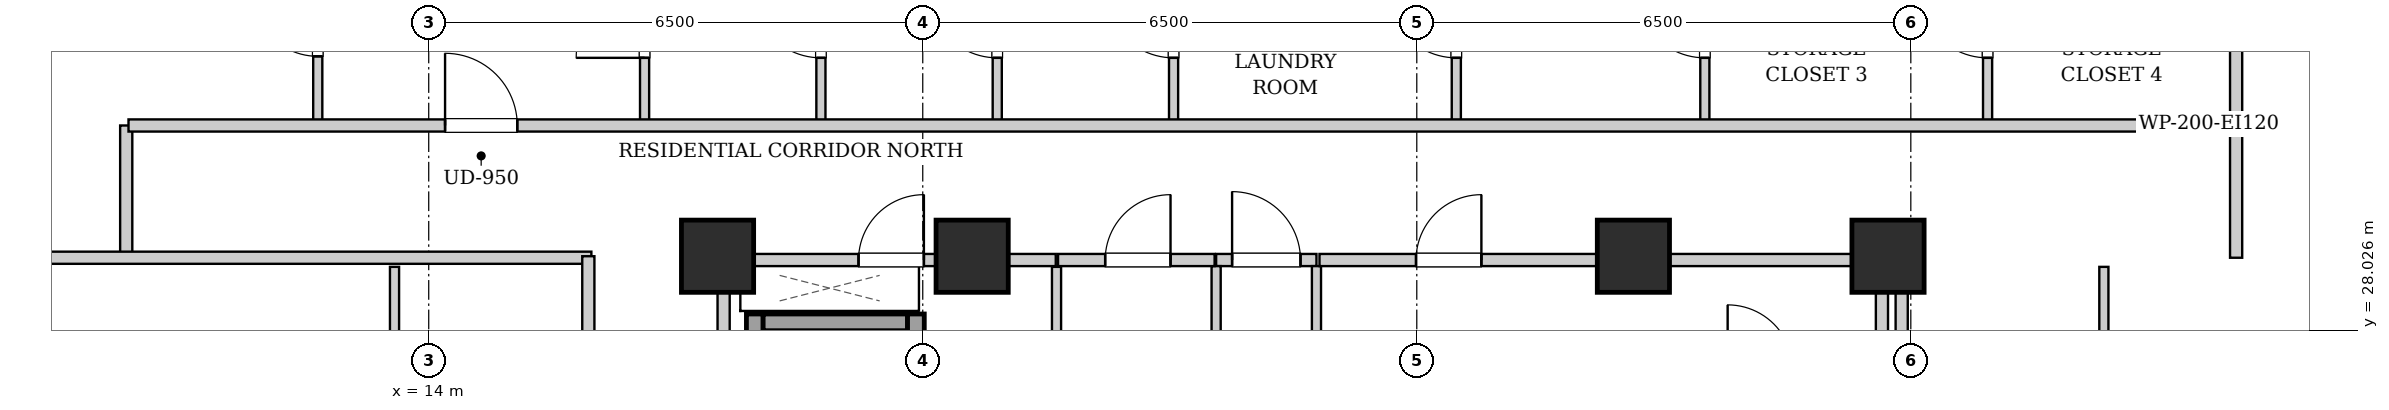
"""IFC4 building model, lengths in metres.
Left out: names, types, materials, properties, quantities, classifications, styles, units other than length and angle.
Written with IfcOpenShell. Run it as: python <this file> out.ifc"""

import sys

from ifc_helpers import new_model, si_unit, direction, frame, frame_2d, origin, origin_2d, place, context, subcontext, project, spatial, rectangle, extrude, element, fill, save


model = new_model("IFC4")
c1 = context("Model", 3, precision=1e-05, world=origin(), true_north=direction((0.0, 1.0)))
c2 = subcontext(c1, "Body", "Model", "MODEL_VIEW")
j1 = project(units=[si_unit("LENGTHUNIT", "METRE"), si_unit("PLANEANGLEUNIT", "RADIAN")], contexts=[c1])
p1 = place(None, origin())
s1 = spatial("IfcSite", under=j1, at=p1, CompositionType="ELEMENT")
p2 = place(p1, origin())
s2 = spatial("IfcBuilding", under=s1, at=p2, CompositionType="ELEMENT")
p3 = place(p2, frame((0.0, 0.0, 156.9)))
s3 = spatial("IfcBuildingStorey", under=s2, at=p3, CompositionType="ELEMENT", Elevation=156.9)
for number, where, z_axis, x_axis in (
    (1, (17.8, 29.0, 0.0), (0.0, 0.0, 1.0), (1.0, 0.0, 0.0)),
    (2, (21.15, 29.0, 0.0), (0.0, 0.0, 1.0), (1.0, 0.0, 0.0)),
    (3, (29.85, 29.0, 0.0), (0.0, 0.0, 1.0), (1.0, 0.0, 0.0)),
    (4, (33.2, 29.0, 0.0), (0.0, 0.0, 1.0), (1.0, 0.0, 0.0)),
):
    element("IfcColumn", number, at=place(p3, frame(where, z_axis=z_axis, x_axis=x_axis)), inside=s3, PredefinedType="COLUMN", context=c2, shape_type="SweptSolid", body=[
        extrude(rectangle(XDim=0.95, YDim=0.95, at=origin_2d()), origin(), (0.0, 0.0, 1.0), 3.25),
    ])
p4 = place(p3, frame((18.29, 24.1, 0.0), z_axis=(0.0, 0.0, 1.0), x_axis=(0.0, 1.0, 0.0)))
e5 = element("IfcWall", 5, at=p4, inside=s3, PredefinedType="SHEAR", context=c2, shape_type="SweptSolid", body=[
    extrude(rectangle(XDim=4.14, YDim=0.22, at=frame_2d((2.07, 0.0))), origin(), (0.0, 0.0, 1.0), 2.99),
])
p5 = place(p3, frame((18.4, 28.13, 0.0), z_axis=(0.0, 0.0, 1.0), x_axis=(1.0, 0.0, 0.0)))
e6 = element("IfcWall", 6, at=p5, inside=s3, PredefinedType="SHEAR", context=c2, shape_type="SweptSolid", body=[
    extrude(rectangle(XDim=1.9, YDim=0.22, at=frame_2d((0.95, 0.0))), origin(), (0.0, 0.0, 1.0), 2.99),
])
p6 = place(p3, frame((20.41, 26.06, 0.0), z_axis=(0.0, 0.0, 1.0), x_axis=(0.0, 1.0, 0.0)))
e7 = element("IfcWall", 7, at=p6, inside=s3, PredefinedType="SHEAR", context=c2, shape_type="SweptSolid", body=[
    extrude(rectangle(XDim=2.18, YDim=0.22, at=frame_2d((1.09, 0.0))), origin(), (0.0, 0.0, 1.0), 2.99),
])
for number, where, z_axis, x_axis in (
    (8, (17.88, 24.12, 0.0), (0.0, 0.0, 1.0), (0.0, 1.0, 0.0)),
    (9, (33.12, 24.12, 0.0), (0.0, 0.0, 1.0), (0.0, 1.0, 0.0)),
):
    element("IfcWall", number, at=place(p3, frame(where, z_axis=z_axis, x_axis=x_axis)), inside=s3, PredefinedType="PARTITIONING", context=c2, shape_type="SweptSolid", body=[
        extrude(rectangle(XDim=4.76, YDim=0.16, at=frame_2d((2.38, 0.0))), origin(), (0.0, 0.0, 1.0), 2.325),
    ])
p7 = place(p3, frame((24.36, 28.95, 0.0), z_axis=(0.0, 0.0, 1.0), x_axis=(1.0, 0.0, 0.0)))
e10 = element("IfcWall", 10, at=p7, inside=s3, PredefinedType="PARTITIONING", context=c2, shape_type="SweptSolid", body=[
    extrude(rectangle(XDim=1.32, YDim=0.16, at=frame_2d((0.66, 0.0))), origin(), (0.0, 0.0, 1.0), 2.442),
])
p8 = place(p7, frame((0.21, 0.0, 0.0)))
e11 = element("IfcOpeningElement", 11, at=p8, cuts=e10, PredefinedType="OPENING", context=c2, shape_type="SweptSolid", body=[
    extrude(rectangle(XDim=0.9, YDim=2.05, at=frame_2d((0.45, 1.025))), frame((0.0, 0.09, 0.0), z_axis=(0.0, -1.0, 0.0), x_axis=(1.0, 0.0, 0.0)), (0.0, 0.0, 1.0), 0.18),
])
p9 = place(p3, frame((17.96, 28.95, 0.0), z_axis=(0.0, 0.0, 1.0), x_axis=(1.0, 0.0, 0.0)))
e12 = element("IfcWall", 12, at=p9, inside=s3, PredefinedType="PARTITIONING", context=c2, shape_type="SweptSolid", body=[
    extrude(rectangle(XDim=4.29, YDim=0.16, at=frame_2d((2.145, 0.0))), origin(), (0.0, 0.0, 1.0), 2.442),
])
p10 = place(p9, frame((1.695, 0.0, 0.0)))
e13 = element("IfcOpeningElement", 13, at=p10, cuts=e12, PredefinedType="OPENING", context=c2, shape_type="SweptSolid", body=[
    extrude(rectangle(XDim=0.86, YDim=2.05, at=frame_2d((0.43, 1.025))), frame((0.0, 0.09, 0.0), z_axis=(0.0, -1.0, 0.0), x_axis=(1.0, 0.0, 0.0)), (0.0, 0.0, 1.0), 0.18),
])
for number, where, z_axis, x_axis in (
    (14, (24.36, 25.0, 0.0), (0.0, 0.0, 1.0), (0.0, 1.0, 0.0)),
    (15, (25.68, 25.0, 0.0), (0.0, 0.0, 1.0), (0.0, 1.0, 0.0)),
):
    element("IfcWall", number, at=place(p3, frame(where, z_axis=z_axis, x_axis=x_axis)), inside=s3, PredefinedType="PARTITIONING", context=c2, shape_type="SweptSolid", body=[
        extrude(rectangle(XDim=3.87, YDim=0.12, at=frame_2d((1.935, 0.0))), origin(), (0.0, 0.0, 1.0), 2.99),
    ])
p11 = place(p3, frame((22.26, 25.0, 0.0), z_axis=(0.0, 0.0, 1.0), x_axis=(0.0, 1.0, 0.0)))
e16 = element("IfcWall", 16, at=p11, inside=s3, PredefinedType="PARTITIONING", context=c2, shape_type="SweptSolid", body=[
    extrude(rectangle(XDim=3.86, YDim=0.12, at=frame_2d((1.93, 0.0))), origin(), (0.0, 0.0, 1.0), 2.99),
])
p12 = place(p3, frame((22.28, 28.95, 0.0), z_axis=(0.0, 0.0, 1.0), x_axis=(1.0, 0.0, 0.0)))
e17 = element("IfcWall", 17, at=p12, inside=s3, PredefinedType="PARTITIONING", context=c2, shape_type="SweptSolid", body=[
    extrude(rectangle(XDim=2.06, YDim=0.16, at=frame_2d((1.03, 0.0))), origin(), (0.0, 0.0, 1.0), 2.442),
])
p13 = place(p12, frame((0.62, 0.0, 0.0)))
e18 = element("IfcOpeningElement", 18, at=p13, cuts=e17, PredefinedType="OPENING", context=c2, shape_type="SweptSolid", body=[
    extrude(rectangle(XDim=0.86, YDim=2.05, at=frame_2d((0.43, 1.025))), frame((0.0, 0.09, 0.0), z_axis=(0.0, -1.0, 0.0), x_axis=(1.0, 0.0, 0.0)), (0.0, 0.0, 1.0), 0.18),
])
p14 = place(p3, frame((25.72, 28.95, 0.0), z_axis=(0.0, 0.0, 1.0), x_axis=(1.0, 0.0, 0.0)))
e19 = element("IfcWall", 19, at=p14, inside=s3, PredefinedType="PARTITIONING", context=c2, shape_type="SweptSolid", body=[
    extrude(rectangle(XDim=7.32, YDim=0.16, at=frame_2d((3.66, 0.0))), origin(), (0.0, 0.0, 1.0), 2.442),
])
p15 = place(p14, frame((1.27, 0.0, 0.0)))
e20 = element("IfcOpeningElement", 20, at=p15, cuts=e19, PredefinedType="OPENING", context=c2, shape_type="SweptSolid", body=[
    extrude(rectangle(XDim=0.86, YDim=2.05, at=frame_2d((0.43, 1.025))), frame((0.0, 0.09, 0.0), z_axis=(0.0, -1.0, 0.0), x_axis=(1.0, 0.0, 0.0)), (0.0, 0.0, 1.0), 0.18),
])
for number, where, z_axis, x_axis in (
    (21, (10.02, 28.98, 0.0), (0.0, 0.0, 1.0), (0.0, 1.0, 0.0)),
    (22, (37.78, 28.98, 0.0), (0.0, 0.0, 1.0), (0.0, 1.0, 0.0)),
):
    element("IfcWall", number, at=place(p3, frame(where, z_axis=z_axis, x_axis=x_axis)), inside=s3, PredefinedType="PARTITIONING", context=c2, shape_type="SweptSolid", body=[
        extrude(rectangle(XDim=1.74, YDim=0.16, at=frame_2d((0.87, 0.0))), origin(), (0.0, 0.0, 1.0), 2.99),
    ])
p16 = place(p3, frame((7.78, 28.98, 0.0), z_axis=(0.0, 0.0, 1.0), x_axis=(1.0, 0.0, 0.0)))
e23 = element("IfcWall", 23, at=p16, inside=s3, PredefinedType="PARTITIONING", context=c2, shape_type="SweptSolid", body=[
    extrude(rectangle(XDim=8.36, YDim=0.16, at=frame_2d((4.18, 0.0))), origin(), (0.0, 0.0, 1.0), 2.442),
])
p17 = place(p3, frame((37.78, 30.76, 0.0), z_axis=(0.0, 0.0, 1.0), x_axis=(0.0, 1.0, 0.0)))
e24 = element("IfcWall", 24, at=p17, inside=s3, PredefinedType="PARTITIONING", context=c2, shape_type="SweptSolid", body=[
    extrude(rectangle(XDim=2.66, YDim=0.16, at=frame_2d((1.33, 0.0))), origin(), (0.0, 0.0, 1.0), 2.99),
])
p18 = place(p3, frame((12.54, 30.76, 0.0), z_axis=(0.0, 0.0, 1.0), x_axis=(0.0, 1.0, 0.0)))
e25 = element("IfcWall", 25, at=p18, inside=s3, PredefinedType="PARTITIONING", context=c2, shape_type="SweptSolid", body=[
    extrude(rectangle(XDim=2.6, YDim=0.12, at=frame_2d((1.3, 0.0))), origin(), (0.0, 0.0, 1.0), 2.99),
])
p19 = place(p18, frame((0.87, 0.0, 0.0)))
e26 = element("IfcOpeningElement", 26, at=p19, cuts=e25, PredefinedType="OPENING", context=c2, shape_type="SweptSolid", body=[
    extrude(rectangle(XDim=0.86, YDim=2.05, at=frame_2d((0.43, 1.025))), frame((0.0, 0.07, 0.0), z_axis=(0.0, -1.0, 0.0), x_axis=(1.0, 0.0, 0.0)), (0.0, 0.0, 1.0), 0.14),
])
p20 = place(p3, frame((16.84, 30.76, 0.0), z_axis=(0.0, 0.0, 1.0), x_axis=(0.0, 1.0, 0.0)))
e27 = element("IfcWall", 27, at=p20, inside=s3, PredefinedType="PARTITIONING", context=c2, shape_type="SweptSolid", body=[
    extrude(rectangle(XDim=2.6, YDim=0.12, at=frame_2d((1.3, 0.0))), origin(), (0.0, 0.0, 1.0), 2.99),
])
p21 = place(p20, frame((0.85, 0.0, 0.0)))
e28 = element("IfcOpeningElement", 28, at=p21, cuts=e27, PredefinedType="OPENING", context=c2, shape_type="SweptSolid", body=[
    extrude(rectangle(XDim=0.9, YDim=2.05, at=frame_2d((0.45, 1.025))), frame((0.0, 0.07, 0.0), z_axis=(0.0, -1.0, 0.0), x_axis=(1.0, 0.0, 0.0)), (0.0, 0.0, 1.0), 0.14),
])
p22 = place(p3, frame((19.16, 30.76, 0.0), z_axis=(0.0, 0.0, 1.0), x_axis=(0.0, 1.0, 0.0)))
e29 = element("IfcWall", 29, at=p22, inside=s3, PredefinedType="PARTITIONING", context=c2, shape_type="SweptSolid", body=[
    extrude(rectangle(XDim=2.6, YDim=0.12, at=frame_2d((1.3, 0.0))), origin(), (0.0, 0.0, 1.0), 2.99),
])
p23 = place(p22, frame((0.85, 0.0, 0.0)))
e30 = element("IfcOpeningElement", 30, at=p23, cuts=e29, PredefinedType="OPENING", context=c2, shape_type="SweptSolid", body=[
    extrude(rectangle(XDim=0.9, YDim=2.05, at=frame_2d((0.45, 1.025))), frame((0.0, 0.07, 0.0), z_axis=(0.0, -1.0, 0.0), x_axis=(1.0, 0.0, 0.0)), (0.0, 0.0, 1.0), 0.14),
])
p24 = place(p3, frame((21.48, 30.76, 0.0), z_axis=(0.0, 0.0, 1.0), x_axis=(0.0, 1.0, 0.0)))
e31 = element("IfcWall", 31, at=p24, inside=s3, PredefinedType="PARTITIONING", context=c2, shape_type="SweptSolid", body=[
    extrude(rectangle(XDim=2.6, YDim=0.12, at=frame_2d((1.3, 0.0))), origin(), (0.0, 0.0, 1.0), 2.99),
])
p25 = place(p24, frame((0.85, 0.0, 0.0)))
e32 = element("IfcOpeningElement", 32, at=p25, cuts=e31, PredefinedType="OPENING", context=c2, shape_type="SweptSolid", body=[
    extrude(rectangle(XDim=0.9, YDim=2.05, at=frame_2d((0.45, 1.025))), frame((0.0, 0.07, 0.0), z_axis=(0.0, -1.0, 0.0), x_axis=(1.0, 0.0, 0.0)), (0.0, 0.0, 1.0), 0.14),
])
p26 = place(p3, frame((23.8, 30.76, 0.0), z_axis=(0.0, 0.0, 1.0), x_axis=(0.0, 1.0, 0.0)))
e33 = element("IfcWall", 33, at=p26, inside=s3, PredefinedType="PARTITIONING", context=c2, shape_type="SweptSolid", body=[
    extrude(rectangle(XDim=2.6, YDim=0.12, at=frame_2d((1.3, 0.0))), origin(), (0.0, 0.0, 1.0), 2.99),
])
p27 = place(p26, frame((0.85, 0.0, 0.0)))
e34 = element("IfcOpeningElement", 34, at=p27, cuts=e33, PredefinedType="OPENING", context=c2, shape_type="SweptSolid", body=[
    extrude(rectangle(XDim=0.9, YDim=2.05, at=frame_2d((0.45, 1.025))), frame((0.0, 0.07, 0.0), z_axis=(0.0, -1.0, 0.0), x_axis=(1.0, 0.0, 0.0)), (0.0, 0.0, 1.0), 0.14),
])
p28 = place(p3, frame((27.52, 30.76, 0.0), z_axis=(0.0, 0.0, 1.0), x_axis=(0.0, 1.0, 0.0)))
e35 = element("IfcWall", 35, at=p28, inside=s3, PredefinedType="PARTITIONING", context=c2, shape_type="SweptSolid", body=[
    extrude(rectangle(XDim=2.6, YDim=0.12, at=frame_2d((1.3, 0.0))), origin(), (0.0, 0.0, 1.0), 2.99),
])
p29 = place(p28, frame((0.85, 0.0, 0.0)))
e36 = element("IfcOpeningElement", 36, at=p29, cuts=e35, PredefinedType="OPENING", context=c2, shape_type="SweptSolid", body=[
    extrude(rectangle(XDim=0.9, YDim=2.05, at=frame_2d((0.45, 1.025))), frame((0.0, 0.07, 0.0), z_axis=(0.0, -1.0, 0.0), x_axis=(1.0, 0.0, 0.0)), (0.0, 0.0, 1.0), 0.14),
])
p30 = place(p3, frame((30.79, 30.76, 0.0), z_axis=(0.0, 0.0, 1.0), x_axis=(0.0, 1.0, 0.0)))
e37 = element("IfcWall", 37, at=p30, inside=s3, PredefinedType="PARTITIONING", context=c2, shape_type="SweptSolid", body=[
    extrude(rectangle(XDim=2.6, YDim=0.12, at=frame_2d((1.3, 0.0))), origin(), (0.0, 0.0, 1.0), 2.99),
])
p31 = place(p30, frame((0.85, 0.0, 0.0)))
e38 = element("IfcOpeningElement", 38, at=p31, cuts=e37, PredefinedType="OPENING", context=c2, shape_type="SweptSolid", body=[
    extrude(rectangle(XDim=0.9, YDim=2.05, at=frame_2d((0.45, 1.025))), frame((0.0, 0.07, 0.0), z_axis=(0.0, -1.0, 0.0), x_axis=(1.0, 0.0, 0.0)), (0.0, 0.0, 1.0), 0.14),
])
p32 = place(p3, frame((34.51, 30.76, 0.0), z_axis=(0.0, 0.0, 1.0), x_axis=(0.0, 1.0, 0.0)))
e39 = element("IfcWall", 39, at=p32, inside=s3, PredefinedType="PARTITIONING", context=c2, shape_type="SweptSolid", body=[
    extrude(rectangle(XDim=2.6, YDim=0.12, at=frame_2d((1.3, 0.0))), origin(), (0.0, 0.0, 1.0), 2.99),
])
p33 = place(p32, frame((0.85, 0.0, 0.0)))
e40 = element("IfcOpeningElement", 40, at=p33, cuts=e39, PredefinedType="OPENING", context=c2, shape_type="SweptSolid", body=[
    extrude(rectangle(XDim=0.9, YDim=2.05, at=frame_2d((0.45, 1.025))), frame((0.0, 0.07, 0.0), z_axis=(0.0, -1.0, 0.0), x_axis=(1.0, 0.0, 0.0)), (0.0, 0.0, 1.0), 0.14),
])
p34 = place(p3, frame((13.55, 24.552, 0.0), z_axis=(0.0, 0.0, 1.0), x_axis=(0.0, 1.0, 0.0)))
e41 = element("IfcWall", 41, at=p34, inside=s3, PredefinedType="PARTITIONING", context=c2, shape_type="SweptSolid", body=[
    extrude(rectangle(XDim=4.308, YDim=0.12, at=frame_2d((2.154, 0.0))), origin(), (0.0, 0.0, 1.0), 2.99),
])
p35 = place(p34, frame((1.704, 0.0, 0.0)))
e42 = element("IfcOpeningElement", 42, at=p35, cuts=e41, PredefinedType="OPENING", context=c2, shape_type="SweptSolid", body=[
    extrude(rectangle(XDim=0.9, YDim=2.05, at=frame_2d((0.45, 1.025))), frame((0.0, 0.07, 0.0), z_axis=(0.0, -1.0, 0.0), x_axis=(1.0, 0.0, 0.0)), (0.0, 0.0, 1.0), 0.14),
])
p36 = place(p3, frame((36.04, 24.552, 0.0), z_axis=(0.0, 0.0, 1.0), x_axis=(0.0, 1.0, 0.0)))
e43 = element("IfcWall", 43, at=p36, inside=s3, PredefinedType="PARTITIONING", context=c2, shape_type="SweptSolid", body=[
    extrude(rectangle(XDim=4.308, YDim=0.12, at=frame_2d((2.154, 0.0))), origin(), (0.0, 0.0, 1.0), 2.99),
])
p37 = place(p36, frame((1.704, 0.0, 0.0)))
e44 = element("IfcOpeningElement", 44, at=p37, cuts=e43, PredefinedType="OPENING", context=c2, shape_type="SweptSolid", body=[
    extrude(rectangle(XDim=0.9, YDim=2.05, at=frame_2d((0.45, 1.025))), frame((0.0, 0.07, 0.0), z_axis=(0.0, -1.0, 0.0), x_axis=(1.0, 0.0, 0.0)), (0.0, 0.0, 1.0), 0.14),
])
p38 = place(p3, frame((10.05, 30.72, 0.0), z_axis=(0.0, 0.0, 1.0), x_axis=(1.0, 0.0, 0.0)))
e45 = element("IfcWall", 45, at=p38, inside=s3, PredefinedType="PARTITIONING", context=c2, shape_type="SweptSolid", body=[
    extrude(rectangle(XDim=27.7, YDim=0.16, at=frame_2d((13.85, 0.0))), origin(), (0.0, 0.0, 1.0), 2.99),
])
p39 = place(p38, frame((4.165, 0.0, 0.0)))
e46 = element("IfcOpeningElement", 46, at=p39, cuts=e45, PredefinedType="OPENING", context=c2, shape_type="SweptSolid", body=[
    extrude(rectangle(XDim=0.95, YDim=2.1, at=frame_2d((0.475, 1.05))), frame((0.0, 0.09, 0.0), z_axis=(0.0, -1.0, 0.0), x_axis=(1.0, 0.0, 0.0)), (0.0, 0.0, 1.0), 0.18),
])
p40 = place(p3, frame((16.1, 15.07, 0.0), z_axis=(0.0, 0.0, 1.0), x_axis=(0.0, 1.0, 0.0)))
e47 = element("IfcWall", 47, at=p40, inside=s3, PredefinedType="PARTITIONING", context=c2, shape_type="SweptSolid", body=[
    extrude(rectangle(XDim=13.93, YDim=0.16, at=frame_2d((6.965, 0.0))), origin(), (0.0, 0.0, 1.0), 2.99),
])
p41 = place(p40, frame((4.385, 0.0, 0.0)))
e48 = element("IfcOpeningElement", 48, at=p41, cuts=e47, PredefinedType="OPENING", context=c2, shape_type="SweptSolid", body=[
    extrude(rectangle(XDim=0.95, YDim=2.1, at=frame_2d((0.475, 1.05))), frame((0.0, 0.09, 0.0), z_axis=(0.0, -1.0, 0.0), x_axis=(1.0, 0.0, 0.0)), (0.0, 0.0, 1.0), 0.18),
])
p42 = place(p3, frame((33.38, 15.02, 0.0), z_axis=(0.0, 0.0, 1.0), x_axis=(0.0, 1.0, 0.0)))
e49 = element("IfcWall", 49, at=p42, inside=s3, PredefinedType="PARTITIONING", context=c2, shape_type="SweptSolid", body=[
    extrude(rectangle(XDim=13.98, YDim=0.16, at=frame_2d((6.99, 0.0))), origin(), (0.0, 0.0, 1.0), 2.325),
])
p43 = place(p8, origin())
e50 = element("IfcDoor", 50, at=p43, inside=s3, OperationType="SINGLE_SWING_LEFT", PredefinedType="DOOR", context=c2, shape_type="SweptSolid", body=[
    extrude(rectangle(XDim=0.9, YDim=2.05, at=frame_2d((0.45, 1.025))), frame((0.0, 0.025, 0.0), z_axis=(0.0, -1.0, 0.0), x_axis=(1.0, 0.0, 0.0)), (0.0, 0.0, 1.0), 0.05),
])
fill(e11, e50)
p44 = place(p10, origin())
e51 = element("IfcDoor", 51, at=p44, inside=s3, OperationType="SINGLE_SWING_RIGHT", PredefinedType="DOOR", context=c2, shape_type="SweptSolid", body=[
    extrude(rectangle(XDim=0.86, YDim=2.05, at=frame_2d((0.43, 1.025))), frame((0.0, 0.025, 0.0), z_axis=(0.0, -1.0, 0.0), x_axis=(1.0, 0.0, 0.0)), (0.0, 0.0, 1.0), 0.05),
])
fill(e13, e51)
p45 = place(p13, origin())
e52 = element("IfcDoor", 52, at=p45, inside=s3, OperationType="SINGLE_SWING_RIGHT", PredefinedType="DOOR", context=c2, shape_type="SweptSolid", body=[
    extrude(rectangle(XDim=0.86, YDim=2.05, at=frame_2d((0.43, 1.025))), frame((0.0, 0.025, 0.0), z_axis=(0.0, -1.0, 0.0), x_axis=(1.0, 0.0, 0.0)), (0.0, 0.0, 1.0), 0.05),
])
fill(e18, e52)
p46 = place(p15, origin())
e53 = element("IfcDoor", 53, at=p46, inside=s3, OperationType="SINGLE_SWING_RIGHT", PredefinedType="DOOR", context=c2, shape_type="SweptSolid", body=[
    extrude(rectangle(XDim=0.86, YDim=2.05, at=frame_2d((0.43, 1.025))), frame((0.0, 0.025, 0.0), z_axis=(0.0, -1.0, 0.0), x_axis=(1.0, 0.0, 0.0)), (0.0, 0.0, 1.0), 0.05),
])
fill(e20, e53)
p47 = place(p19, origin())
e54 = element("IfcDoor", 54, at=p47, inside=s3, OperationType="SINGLE_SWING_RIGHT", PredefinedType="DOOR", context=c2, shape_type="SweptSolid", body=[
    extrude(rectangle(XDim=0.86, YDim=2.05, at=frame_2d((0.43, 1.025))), frame((0.0, 0.025, 0.0), z_axis=(0.0, -1.0, 0.0), x_axis=(1.0, 0.0, 0.0)), (0.0, 0.0, 1.0), 0.05),
])
fill(e26, e54)
p48 = place(p21, origin())
e55 = element("IfcDoor", 55, at=p48, inside=s3, OperationType="SINGLE_SWING_LEFT", PredefinedType="DOOR", context=c2, shape_type="SweptSolid", body=[
    extrude(rectangle(XDim=0.9, YDim=2.05, at=frame_2d((0.45, 1.025))), frame((0.0, 0.025, 0.0), z_axis=(0.0, -1.0, 0.0), x_axis=(1.0, 0.0, 0.0)), (0.0, 0.0, 1.0), 0.05),
])
fill(e28, e55)
p49 = place(p23, origin())
e56 = element("IfcDoor", 56, at=p49, inside=s3, OperationType="SINGLE_SWING_RIGHT", PredefinedType="DOOR", context=c2, shape_type="SweptSolid", body=[
    extrude(rectangle(XDim=0.9, YDim=2.05, at=frame_2d((0.45, 1.025))), frame((0.0, 0.025, 0.0), z_axis=(0.0, -1.0, 0.0), x_axis=(1.0, 0.0, 0.0)), (0.0, 0.0, 1.0), 0.05),
])
fill(e30, e56)
p50 = place(p25, origin())
e57 = element("IfcDoor", 57, at=p50, inside=s3, OperationType="SINGLE_SWING_RIGHT", PredefinedType="DOOR", context=c2, shape_type="SweptSolid", body=[
    extrude(rectangle(XDim=0.9, YDim=2.05, at=frame_2d((0.45, 1.025))), frame((0.0, 0.025, 0.0), z_axis=(0.0, -1.0, 0.0), x_axis=(1.0, 0.0, 0.0)), (0.0, 0.0, 1.0), 0.05),
])
fill(e32, e57)
p51 = place(p27, origin())
e58 = element("IfcDoor", 58, at=p51, inside=s3, OperationType="SINGLE_SWING_RIGHT", PredefinedType="DOOR", context=c2, shape_type="SweptSolid", body=[
    extrude(rectangle(XDim=0.9, YDim=2.05, at=frame_2d((0.45, 1.025))), frame((0.0, 0.025, 0.0), z_axis=(0.0, -1.0, 0.0), x_axis=(1.0, 0.0, 0.0)), (0.0, 0.0, 1.0), 0.05),
])
fill(e34, e58)
p52 = place(p29, origin())
e59 = element("IfcDoor", 59, at=p52, inside=s3, OperationType="SINGLE_SWING_RIGHT", PredefinedType="DOOR", context=c2, shape_type="SweptSolid", body=[
    extrude(rectangle(XDim=0.9, YDim=2.05, at=frame_2d((0.45, 1.025))), frame((0.0, 0.025, 0.0), z_axis=(0.0, -1.0, 0.0), x_axis=(1.0, 0.0, 0.0)), (0.0, 0.0, 1.0), 0.05),
])
fill(e36, e59)
p53 = place(p31, origin())
e60 = element("IfcDoor", 60, at=p53, inside=s3, OperationType="SINGLE_SWING_RIGHT", PredefinedType="DOOR", context=c2, shape_type="SweptSolid", body=[
    extrude(rectangle(XDim=0.9, YDim=2.05, at=frame_2d((0.45, 1.025))), frame((0.0, 0.025, 0.0), z_axis=(0.0, -1.0, 0.0), x_axis=(1.0, 0.0, 0.0)), (0.0, 0.0, 1.0), 0.05),
])
fill(e38, e60)
p54 = place(p33, origin())
e61 = element("IfcDoor", 61, at=p54, inside=s3, OperationType="SINGLE_SWING_RIGHT", PredefinedType="DOOR", context=c2, shape_type="SweptSolid", body=[
    extrude(rectangle(XDim=0.9, YDim=2.05, at=frame_2d((0.45, 1.025))), frame((0.0, 0.025, 0.0), z_axis=(0.0, -1.0, 0.0), x_axis=(1.0, 0.0, 0.0)), (0.0, 0.0, 1.0), 0.05),
])
fill(e40, e61)
p55 = place(p39, origin())
e62 = element("IfcDoor", 62, at=p55, inside=s3, OperationType="SINGLE_SWING_LEFT", PredefinedType="DOOR", context=c2, shape_type="SweptSolid", body=[
    extrude(rectangle(XDim=0.95, YDim=2.1, at=frame_2d((0.475, 1.05))), frame((0.0, 0.025, 0.0), z_axis=(0.0, -1.0, 0.0), x_axis=(1.0, 0.0, 0.0)), (0.0, 0.0, 1.0), 0.05),
])
fill(e46, e62)
save(model, sys.argv[1])
